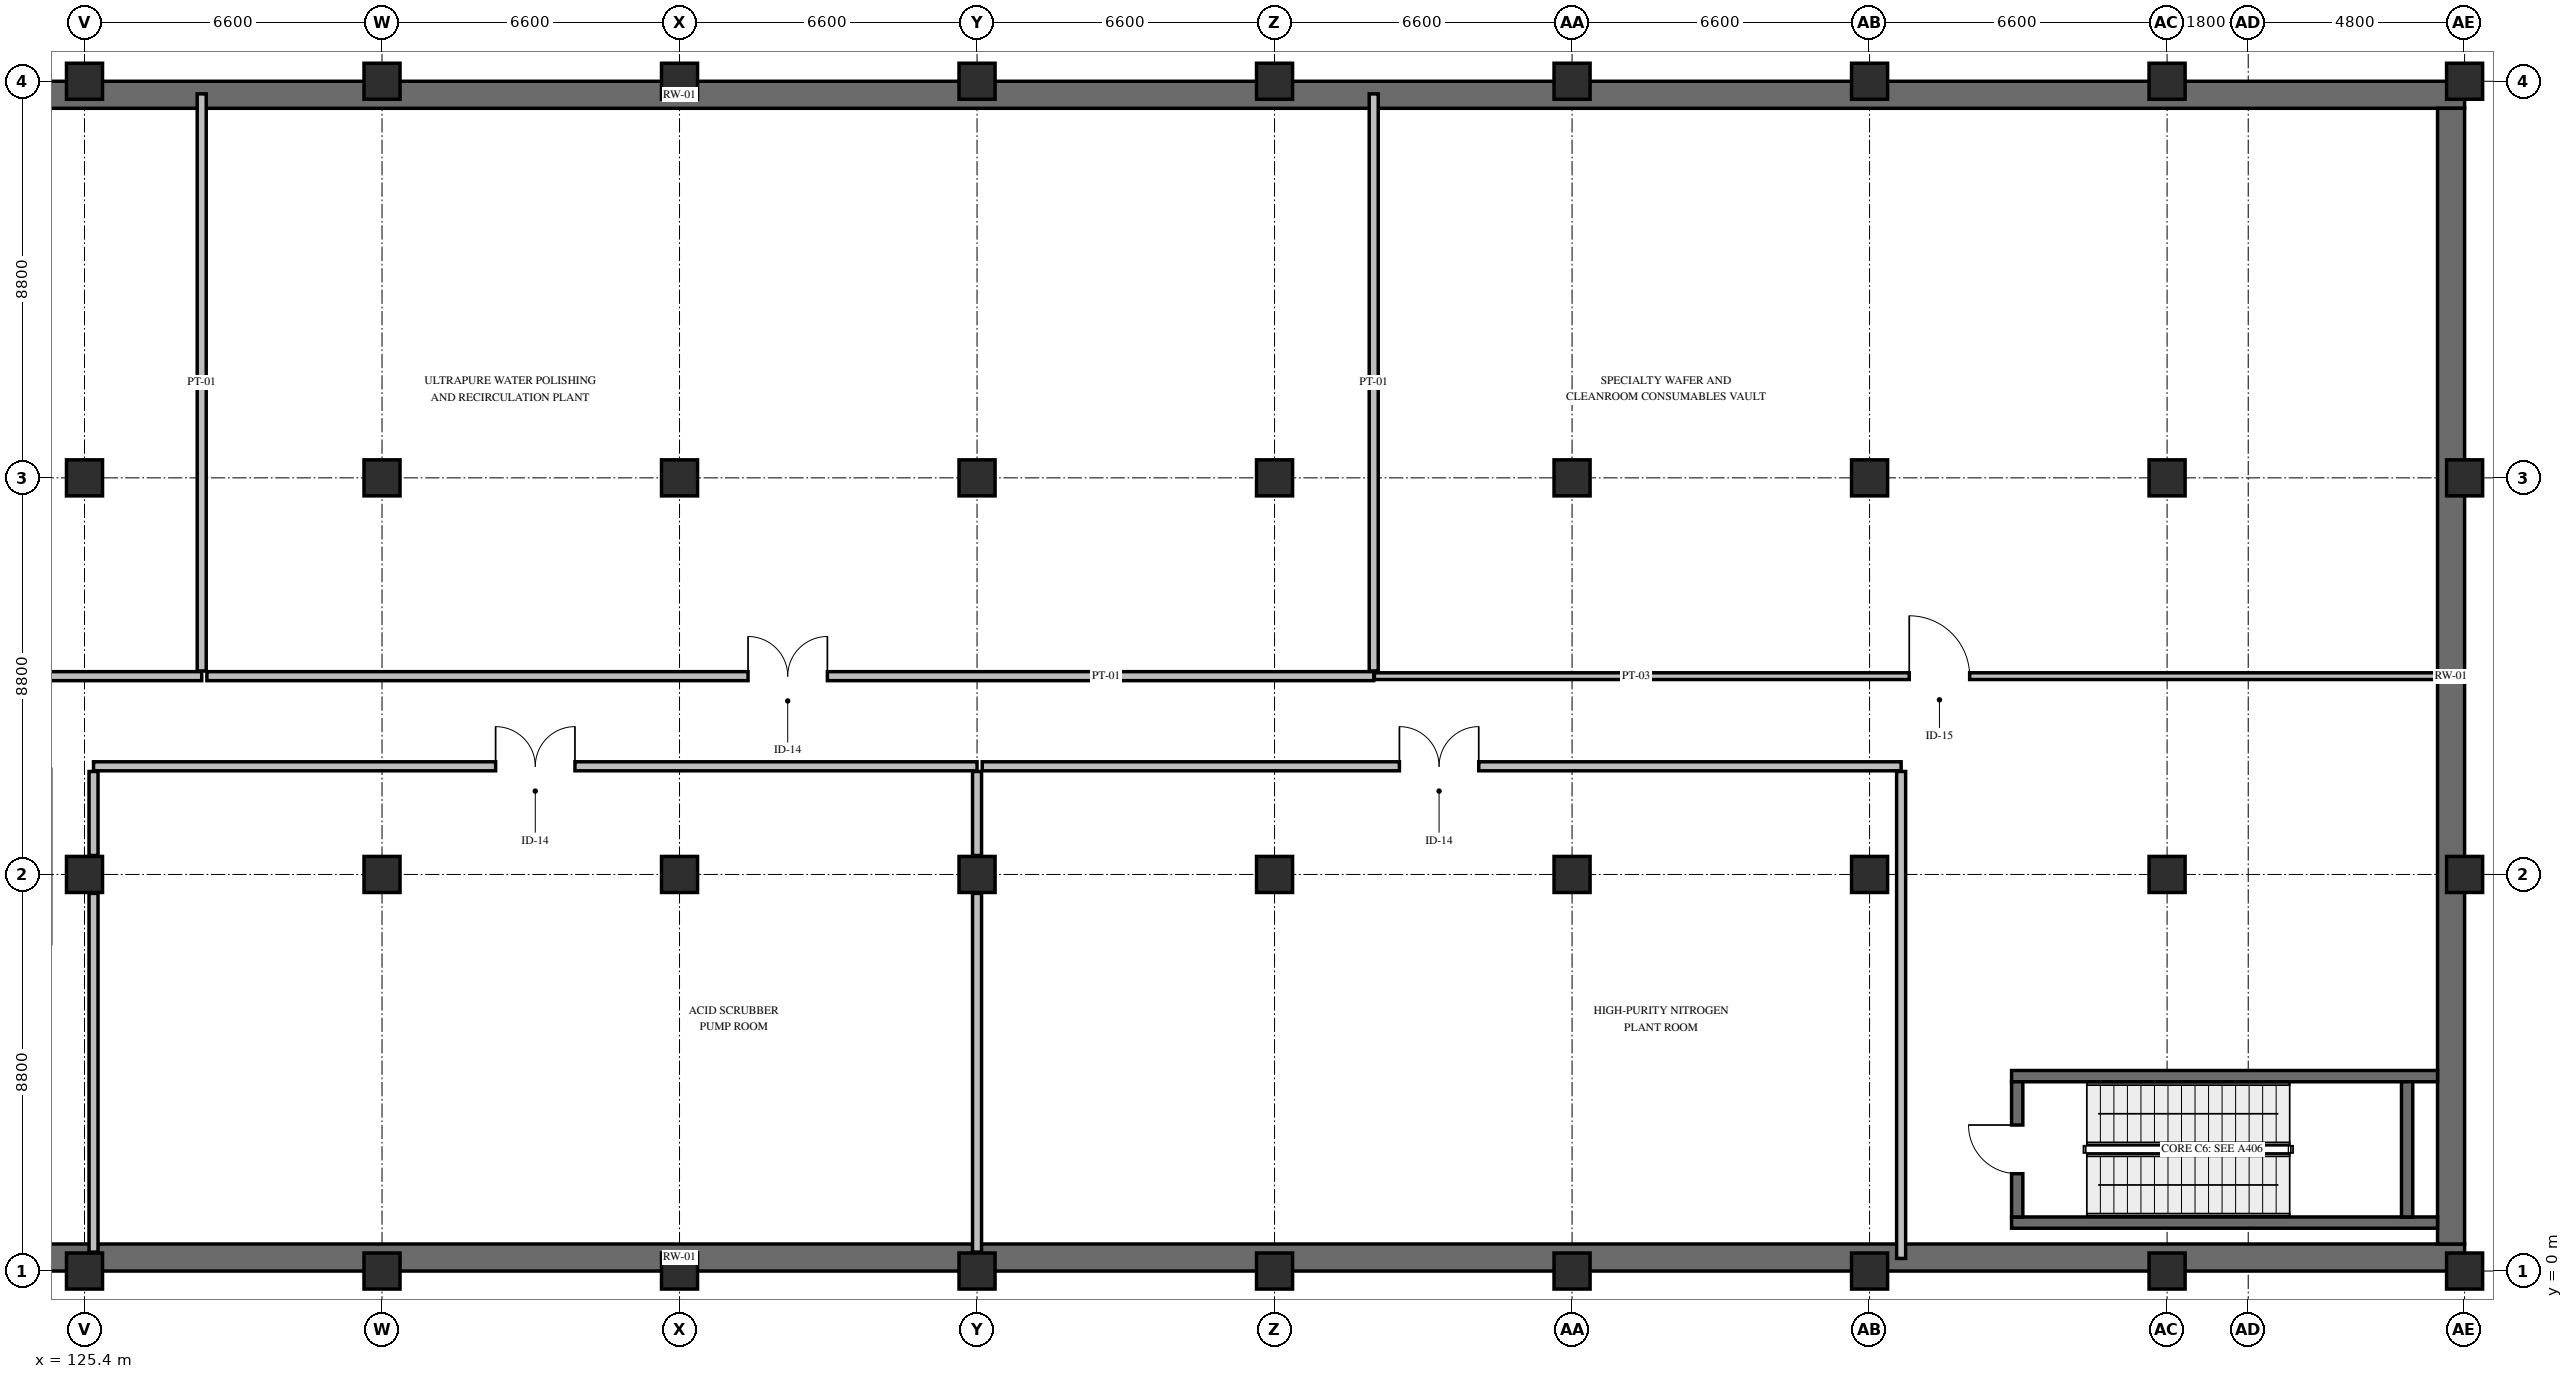
"""IFC4 building model, lengths in metres.
Left out: names, types, materials, properties, quantities, classifications, styles, units other than length and angle.
Written with IfcOpenShell. Run it as: python <this file> out.ifc"""

import sys

from ifc_helpers import new_model, si_unit, direction, frame, frame_2d, origin, origin_2d, place, context, subcontext, project, spatial, rectangle, extrude, element, fill, save


model = new_model("IFC4")
c1 = context("Model", 3, precision=1e-05, world=origin(), true_north=direction((0.0, 1.0)))
c2 = subcontext(c1, "Body", "Model", "MODEL_VIEW")
j1 = project(units=[si_unit("LENGTHUNIT", "METRE"), si_unit("PLANEANGLEUNIT", "RADIAN")], contexts=[c1])
p1 = place(None, origin())
s1 = spatial("IfcSite", under=j1, at=p1, CompositionType="ELEMENT")
p2 = place(p1, origin())
s2 = spatial("IfcBuilding", under=s1, at=p2, CompositionType="ELEMENT")
p3 = place(p2, frame((0.0, 0.0, -5.4)))
s3 = spatial("IfcBuildingStorey", under=s2, at=p3, CompositionType="ELEMENT", Elevation=-5.4)
for number, where, z_axis, x_axis in (
    (1, (99.0, 0.3, 0.0), (0.0, 0.0, 1.0), (1.0, 0.0, 0.0)),
    (2, (99.0, 26.1, 0.0), (0.0, 0.0, 1.0), (1.0, 0.0, 0.0)),
):
    element("IfcWall", number, at=place(p3, frame(where, z_axis=z_axis, x_axis=x_axis)), inside=s3, PredefinedType="USERDEFINED", context=c2, shape_type="SweptSolid", body=[
        extrude(rectangle(XDim=79.2, YDim=0.6, at=frame_2d((39.6, 0.0))), origin(), (0.0, 0.0, 1.0), 4.96),
    ])
p4 = place(p3, frame((177.9, 0.6, 0.0), z_axis=(0.0, 0.0, 1.0), x_axis=(0.0, 1.0, 0.0)))
e3 = element("IfcWall", 3, at=p4, inside=s3, PredefinedType="USERDEFINED", context=c2, shape_type="SweptSolid", body=[
    extrude(rectangle(XDim=25.2, YDim=0.6, at=frame_2d((12.6, 0.0))), origin(), (0.0, 0.0, 1.0), 4.96),
])
for number, where, z_axis, x_axis in (
    (4, (125.4, 0.0, 0.0), (0.0, 0.0, 1.0), (1.0, 0.0, 0.0)),
    (5, (125.4, 8.8, 0.0), (0.0, 0.0, 1.0), (1.0, 0.0, 0.0)),
    (6, (125.4, 17.6, 0.0), (0.0, 0.0, 1.0), (1.0, 0.0, 0.0)),
    (7, (125.4, 26.4, 0.0), (0.0, 0.0, 1.0), (1.0, 0.0, 0.0)),
    (8, (132.0, 0.0, 0.0), (0.0, 0.0, 1.0), (1.0, 0.0, 0.0)),
    (9, (132.0, 8.8, 0.0), (0.0, 0.0, 1.0), (1.0, 0.0, 0.0)),
    (10, (132.0, 17.6, 0.0), (0.0, 0.0, 1.0), (1.0, 0.0, 0.0)),
    (11, (132.0, 26.4, 0.0), (0.0, 0.0, 1.0), (1.0, 0.0, 0.0)),
    (12, (138.6, 0.0, 0.0), (0.0, 0.0, 1.0), (1.0, 0.0, 0.0)),
    (13, (138.6, 8.8, 0.0), (0.0, 0.0, 1.0), (1.0, 0.0, 0.0)),
    (14, (138.6, 17.6, 0.0), (0.0, 0.0, 1.0), (1.0, 0.0, 0.0)),
    (15, (138.6, 26.4, 0.0), (0.0, 0.0, 1.0), (1.0, 0.0, 0.0)),
    (16, (145.2, 0.0, 0.0), (0.0, 0.0, 1.0), (1.0, 0.0, 0.0)),
    (17, (145.2, 8.8, 0.0), (0.0, 0.0, 1.0), (1.0, 0.0, 0.0)),
    (18, (145.2, 17.6, 0.0), (0.0, 0.0, 1.0), (1.0, 0.0, 0.0)),
    (19, (145.2, 26.4, 0.0), (0.0, 0.0, 1.0), (1.0, 0.0, 0.0)),
    (20, (151.8, 0.0, 0.0), (0.0, 0.0, 1.0), (1.0, 0.0, 0.0)),
    (21, (151.8, 8.8, 0.0), (0.0, 0.0, 1.0), (1.0, 0.0, 0.0)),
    (22, (151.8, 17.6, 0.0), (0.0, 0.0, 1.0), (1.0, 0.0, 0.0)),
    (23, (151.8, 26.4, 0.0), (0.0, 0.0, 1.0), (1.0, 0.0, 0.0)),
    (24, (158.4, 0.0, 0.0), (0.0, 0.0, 1.0), (1.0, 0.0, 0.0)),
    (25, (158.4, 8.8, 0.0), (0.0, 0.0, 1.0), (1.0, 0.0, 0.0)),
    (26, (158.4, 17.6, 0.0), (0.0, 0.0, 1.0), (1.0, 0.0, 0.0)),
    (27, (158.4, 26.4, 0.0), (0.0, 0.0, 1.0), (1.0, 0.0, 0.0)),
    (28, (165.0, 0.0, 0.0), (0.0, 0.0, 1.0), (1.0, 0.0, 0.0)),
    (29, (165.0, 8.8, 0.0), (0.0, 0.0, 1.0), (1.0, 0.0, 0.0)),
    (30, (165.0, 17.6, 0.0), (0.0, 0.0, 1.0), (1.0, 0.0, 0.0)),
    (31, (165.0, 26.4, 0.0), (0.0, 0.0, 1.0), (1.0, 0.0, 0.0)),
    (32, (171.6, 0.0, 0.0), (0.0, 0.0, 1.0), (1.0, 0.0, 0.0)),
    (33, (171.6, 8.8, 0.0), (0.0, 0.0, 1.0), (1.0, 0.0, 0.0)),
    (34, (171.6, 17.6, 0.0), (0.0, 0.0, 1.0), (1.0, 0.0, 0.0)),
    (35, (171.6, 26.4, 0.0), (0.0, 0.0, 1.0), (1.0, 0.0, 0.0)),
    (36, (178.2, 0.0, 0.0), (0.0, 0.0, 1.0), (1.0, 0.0, 0.0)),
    (37, (178.2, 8.8, 0.0), (0.0, 0.0, 1.0), (1.0, 0.0, 0.0)),
    (38, (178.2, 17.6, 0.0), (0.0, 0.0, 1.0), (1.0, 0.0, 0.0)),
    (39, (178.2, 26.4, 0.0), (0.0, 0.0, 1.0), (1.0, 0.0, 0.0)),
):
    element("IfcColumn", number, at=place(p3, frame(where, z_axis=z_axis, x_axis=x_axis)), inside=s3, PredefinedType="COLUMN", context=c2, shape_type="SweptSolid", body=[
        extrude(rectangle(XDim=0.8, YDim=0.8, at=origin_2d()), origin(), (0.0, 0.0, 1.0), 5.4),
    ])
for number, where, z_axis, x_axis in (
    (40, (168.15, 1.075, 0.0), (0.0, 0.0, 1.0), (1.0, 0.0, 0.0)),
    (41, (168.15, 4.325, 0.0), (0.0, 0.0, 1.0), (1.0, 0.0, 0.0)),
):
    element("IfcWall", number, at=place(p3, frame(where, z_axis=z_axis, x_axis=x_axis)), inside=s3, PredefinedType="SHEAR", context=c2, shape_type="SweptSolid", body=[
        extrude(rectangle(XDim=9.45, YDim=0.25, at=frame_2d((4.725, 0.0))), origin(), (0.0, 0.0, 1.0), 4.96),
    ])
p5 = place(p3, frame((168.275, 1.2, 0.0), z_axis=(0.0, 0.0, 1.0), x_axis=(0.0, 1.0, 0.0)))
e42 = element("IfcWall", 42, at=p5, inside=s3, PredefinedType="SHEAR", context=c2, shape_type="SweptSolid", body=[
    extrude(rectangle(XDim=3.0, YDim=0.25, at=frame_2d((1.5, 0.0))), origin(), (0.0, 0.0, 1.0), 4.96),
])
p6 = place(p5, frame((0.96, 0.0, 0.0)))
e43 = element("IfcOpeningElement", 43, at=p6, cuts=e42, PredefinedType="OPENING", context=c2, shape_type="SweptSolid", body=[
    extrude(rectangle(XDim=1.08, YDim=2.2, at=frame_2d((0.54, 1.1))), frame((0.0, 0.14, 0.0), z_axis=(0.0, -1.0, 0.0), x_axis=(1.0, 0.0, 0.0)), (0.0, 0.0, 1.0), 0.28),
])
p7 = place(p3, frame((176.925, 1.2, 0.0), z_axis=(0.0, 0.0, 1.0), x_axis=(0.0, 1.0, 0.0)))
e44 = element("IfcWall", 44, at=p7, inside=s3, PredefinedType="SHEAR", context=c2, shape_type="SweptSolid", body=[
    extrude(rectangle(XDim=3.0, YDim=0.25, at=frame_2d((1.5, 0.0))), origin(), (0.0, 0.0, 1.0), 4.96),
])
p8 = place(p3, frame((99.28, 13.2, 0.0), z_axis=(0.0, 0.0, 1.0), x_axis=(1.0, 0.0, 0.0)))
e45 = element("IfcWall", 45, at=p8, inside=s3, PredefinedType="PARTITIONING", context=c2, shape_type="SweptSolid", body=[
    extrude(rectangle(XDim=28.72, YDim=0.2, at=frame_2d((14.36, 0.0))), origin(), (0.0, 0.0, 1.0), 4.665),
])
p9 = place(p8, frame((13.48, 0.0, 0.0)))
e46 = element("IfcOpeningElement", 46, at=p9, cuts=e45, PredefinedType="OPENING", context=c2, shape_type="SweptSolid", body=[
    extrude(rectangle(XDim=1.76, YDim=2.35, at=frame_2d((0.88, 1.175))), frame((0.0, 0.115, 0.0), z_axis=(0.0, -1.0, 0.0), x_axis=(1.0, 0.0, 0.0)), (0.0, 0.0, 1.0), 0.23),
])
p10 = place(p3, frame((128.0, 13.315, 0.0), z_axis=(0.0, 0.0, 1.0), x_axis=(0.0, 1.0, 0.0)))
e47 = element("IfcWall", 47, at=p10, inside=s3, PredefinedType="PARTITIONING", context=c2, shape_type="SweptSolid", body=[
    extrude(rectangle(XDim=12.805, YDim=0.2, at=frame_2d((6.403, 0.0))), origin(), (0.0, 0.0, 1.0), 4.665),
])
p11 = place(p3, frame((128.115, 13.2, 0.0), z_axis=(0.0, 0.0, 1.0), x_axis=(1.0, 0.0, 0.0)))
e48 = element("IfcWall", 48, at=p11, inside=s3, PredefinedType="PARTITIONING", context=c2, shape_type="SweptSolid", body=[
    extrude(rectangle(XDim=25.885, YDim=0.2, at=frame_2d((12.942, 0.0))), origin(), (0.0, 0.0, 1.0), 4.665),
])
p12 = place(p11, frame((12.005, 0.0, 0.0)))
e49 = element("IfcOpeningElement", 49, at=p12, cuts=e48, PredefinedType="OPENING", context=c2, shape_type="SweptSolid", body=[
    extrude(rectangle(XDim=1.76, YDim=2.35, at=frame_2d((0.88, 1.175))), frame((0.0, 0.115, 0.0), z_axis=(0.0, -1.0, 0.0), x_axis=(1.0, 0.0, 0.0)), (0.0, 0.0, 1.0), 0.23),
])
p13 = place(p3, frame((154.0, 13.315, 0.0), z_axis=(0.0, 0.0, 1.0), x_axis=(0.0, 1.0, 0.0)))
e50 = element("IfcWall", 50, at=p13, inside=s3, PredefinedType="PARTITIONING", context=c2, shape_type="SweptSolid", body=[
    extrude(rectangle(XDim=12.805, YDim=0.2, at=frame_2d((6.403, 0.0))), origin(), (0.0, 0.0, 1.0), 4.665),
])
p14 = place(p3, frame((154.015, 13.2, 0.0), z_axis=(0.0, 0.0, 1.0), x_axis=(1.0, 0.0, 0.0)))
e51 = element("IfcWall", 51, at=p14, inside=s3, PredefinedType="PARTITIONING", context=c2, shape_type="SweptSolid", body=[
    extrude(rectangle(XDim=23.905, YDim=0.15, at=frame_2d((11.953, 0.0))), origin(), (0.0, 0.0, 1.0), 4.665),
])
p15 = place(p14, frame((11.865, 0.0, 0.0)))
e52 = element("IfcOpeningElement", 52, at=p15, cuts=e51, PredefinedType="OPENING", context=c2, shape_type="SweptSolid", body=[
    extrude(rectangle(XDim=1.34, YDim=2.2, at=frame_2d((0.67, 1.1))), frame((0.0, 0.09, 0.0), z_axis=(0.0, -1.0, 0.0), x_axis=(1.0, 0.0, 0.0)), (0.0, 0.0, 1.0), 0.18),
])
p16 = place(p3, frame((125.6, 11.2, 0.0), z_axis=(0.0, 0.0, 1.0), x_axis=(1.0, 0.0, 0.0)))
e53 = element("IfcWall", 53, at=p16, inside=s3, PredefinedType="PARTITIONING", context=c2, shape_type="SweptSolid", body=[
    extrude(rectangle(XDim=19.6, YDim=0.2, at=frame_2d((9.8, 0.0))), origin(), (0.0, 0.0, 1.0), 4.665),
])
p17 = place(p16, frame((8.92, 0.0, 0.0)))
e54 = element("IfcOpeningElement", 54, at=p17, cuts=e53, PredefinedType="OPENING", context=c2, shape_type="SweptSolid", body=[
    extrude(rectangle(XDim=1.76, YDim=2.35, at=frame_2d((0.88, 1.175))), frame((0.0, 0.115, 0.0), z_axis=(0.0, -1.0, 0.0), x_axis=(1.0, 0.0, 0.0)), (0.0, 0.0, 1.0), 0.23),
])
p18 = place(p3, frame((125.6, 0.42, 0.0), z_axis=(0.0, 0.0, 1.0), x_axis=(0.0, 1.0, 0.0)))
e55 = element("IfcWall", 55, at=p18, inside=s3, PredefinedType="PARTITIONING", context=c2, shape_type="SweptSolid", body=[
    extrude(rectangle(XDim=7.96, YDim=0.2, at=frame_2d((3.98, 0.0))), origin(), (0.0, 0.0, 1.0), 4.665),
])
p19 = place(p3, frame((125.6, 9.22, 0.0), z_axis=(0.0, 0.0, 1.0), x_axis=(0.0, 1.0, 0.0)))
e56 = element("IfcWall", 56, at=p19, inside=s3, PredefinedType="PARTITIONING", context=c2, shape_type="SweptSolid", body=[
    extrude(rectangle(XDim=1.865, YDim=0.2, at=frame_2d((0.933, 0.0))), origin(), (0.0, 0.0, 1.0), 4.665),
])
p20 = place(p3, frame((145.2, 0.42, 0.0), z_axis=(0.0, 0.0, 1.0), x_axis=(0.0, 1.0, 0.0)))
e57 = element("IfcWall", 57, at=p20, inside=s3, PredefinedType="PARTITIONING", context=c2, shape_type="SweptSolid", body=[
    extrude(rectangle(XDim=7.96, YDim=0.2, at=frame_2d((3.98, 0.0))), origin(), (0.0, 0.0, 1.0), 4.665),
])
p21 = place(p3, frame((145.2, 9.22, 0.0), z_axis=(0.0, 0.0, 1.0), x_axis=(0.0, 1.0, 0.0)))
e58 = element("IfcWall", 58, at=p21, inside=s3, PredefinedType="PARTITIONING", context=c2, shape_type="SweptSolid", body=[
    extrude(rectangle(XDim=1.865, YDim=0.2, at=frame_2d((0.933, 0.0))), origin(), (0.0, 0.0, 1.0), 4.665),
])
p22 = place(p3, frame((145.315, 11.2, 0.0), z_axis=(0.0, 0.0, 1.0), x_axis=(1.0, 0.0, 0.0)))
e59 = element("IfcWall", 59, at=p22, inside=s3, PredefinedType="PARTITIONING", context=c2, shape_type="SweptSolid", body=[
    extrude(rectangle(XDim=20.385, YDim=0.2, at=frame_2d((10.192, 0.0))), origin(), (0.0, 0.0, 1.0), 4.665),
])
p23 = place(p22, frame((9.255, 0.0, 0.0)))
e60 = element("IfcOpeningElement", 60, at=p23, cuts=e59, PredefinedType="OPENING", context=c2, shape_type="SweptSolid", body=[
    extrude(rectangle(XDim=1.76, YDim=2.35, at=frame_2d((0.88, 1.175))), frame((0.0, 0.115, 0.0), z_axis=(0.0, -1.0, 0.0), x_axis=(1.0, 0.0, 0.0)), (0.0, 0.0, 1.0), 0.23),
])
p24 = place(p3, frame((165.7, 0.28, 0.0), z_axis=(0.0, 0.0, 1.0), x_axis=(0.0, 1.0, 0.0)))
e61 = element("IfcWall", 61, at=p24, inside=s3, PredefinedType="PARTITIONING", context=c2, shape_type="SweptSolid", body=[
    extrude(rectangle(XDim=10.805, YDim=0.2, at=frame_2d((5.402, 0.0))), origin(), (0.0, 0.0, 1.0), 4.665),
])
p25 = place(p6, origin())
e62 = element("IfcDoor", 62, at=p25, inside=s3, OperationType="SINGLE_SWING_RIGHT", PredefinedType="DOOR", context=c2, shape_type="SweptSolid", body=[
    extrude(rectangle(XDim=1.08, YDim=2.2, at=frame_2d((0.54, 1.1))), frame((0.0, 0.025, 0.0), z_axis=(0.0, -1.0, 0.0), x_axis=(1.0, 0.0, 0.0)), (0.0, 0.0, 1.0), 0.05),
])
fill(e43, e62)
p26 = place(p12, origin())
e63 = element("IfcDoor", 63, at=p26, inside=s3, OperationType="DOUBLE_DOOR_SINGLE_SWING", PredefinedType="DOOR", context=c2, shape_type="SweptSolid", body=[
    extrude(rectangle(XDim=1.76, YDim=2.35, at=frame_2d((0.88, 1.175))), frame((0.0, 0.025, 0.0), z_axis=(0.0, -1.0, 0.0), x_axis=(1.0, 0.0, 0.0)), (0.0, 0.0, 1.0), 0.05),
])
fill(e49, e63)
p27 = place(p15, origin())
e64 = element("IfcDoor", 64, at=p27, inside=s3, OperationType="SINGLE_SWING_LEFT", PredefinedType="DOOR", context=c2, shape_type="SweptSolid", body=[
    extrude(rectangle(XDim=1.34, YDim=2.2, at=frame_2d((0.67, 1.1))), frame((0.0, 0.025, 0.0), z_axis=(0.0, -1.0, 0.0), x_axis=(1.0, 0.0, 0.0)), (0.0, 0.0, 1.0), 0.05),
])
fill(e52, e64)
p28 = place(p17, origin())
e65 = element("IfcDoor", 65, at=p28, inside=s3, OperationType="DOUBLE_DOOR_SINGLE_SWING", PredefinedType="DOOR", context=c2, shape_type="SweptSolid", body=[
    extrude(rectangle(XDim=1.76, YDim=2.35, at=frame_2d((0.88, 1.175))), frame((0.0, 0.025, 0.0), z_axis=(0.0, -1.0, 0.0), x_axis=(1.0, 0.0, 0.0)), (0.0, 0.0, 1.0), 0.05),
])
fill(e54, e65)
p29 = place(p23, origin())
e66 = element("IfcDoor", 66, at=p29, inside=s3, OperationType="DOUBLE_DOOR_SINGLE_SWING", PredefinedType="DOOR", context=c2, shape_type="SweptSolid", body=[
    extrude(rectangle(XDim=1.76, YDim=2.35, at=frame_2d((0.88, 1.175))), frame((0.0, 0.025, 0.0), z_axis=(0.0, -1.0, 0.0), x_axis=(1.0, 0.0, 0.0)), (0.0, 0.0, 1.0), 0.05),
])
fill(e60, e66)
save(model, sys.argv[1])
